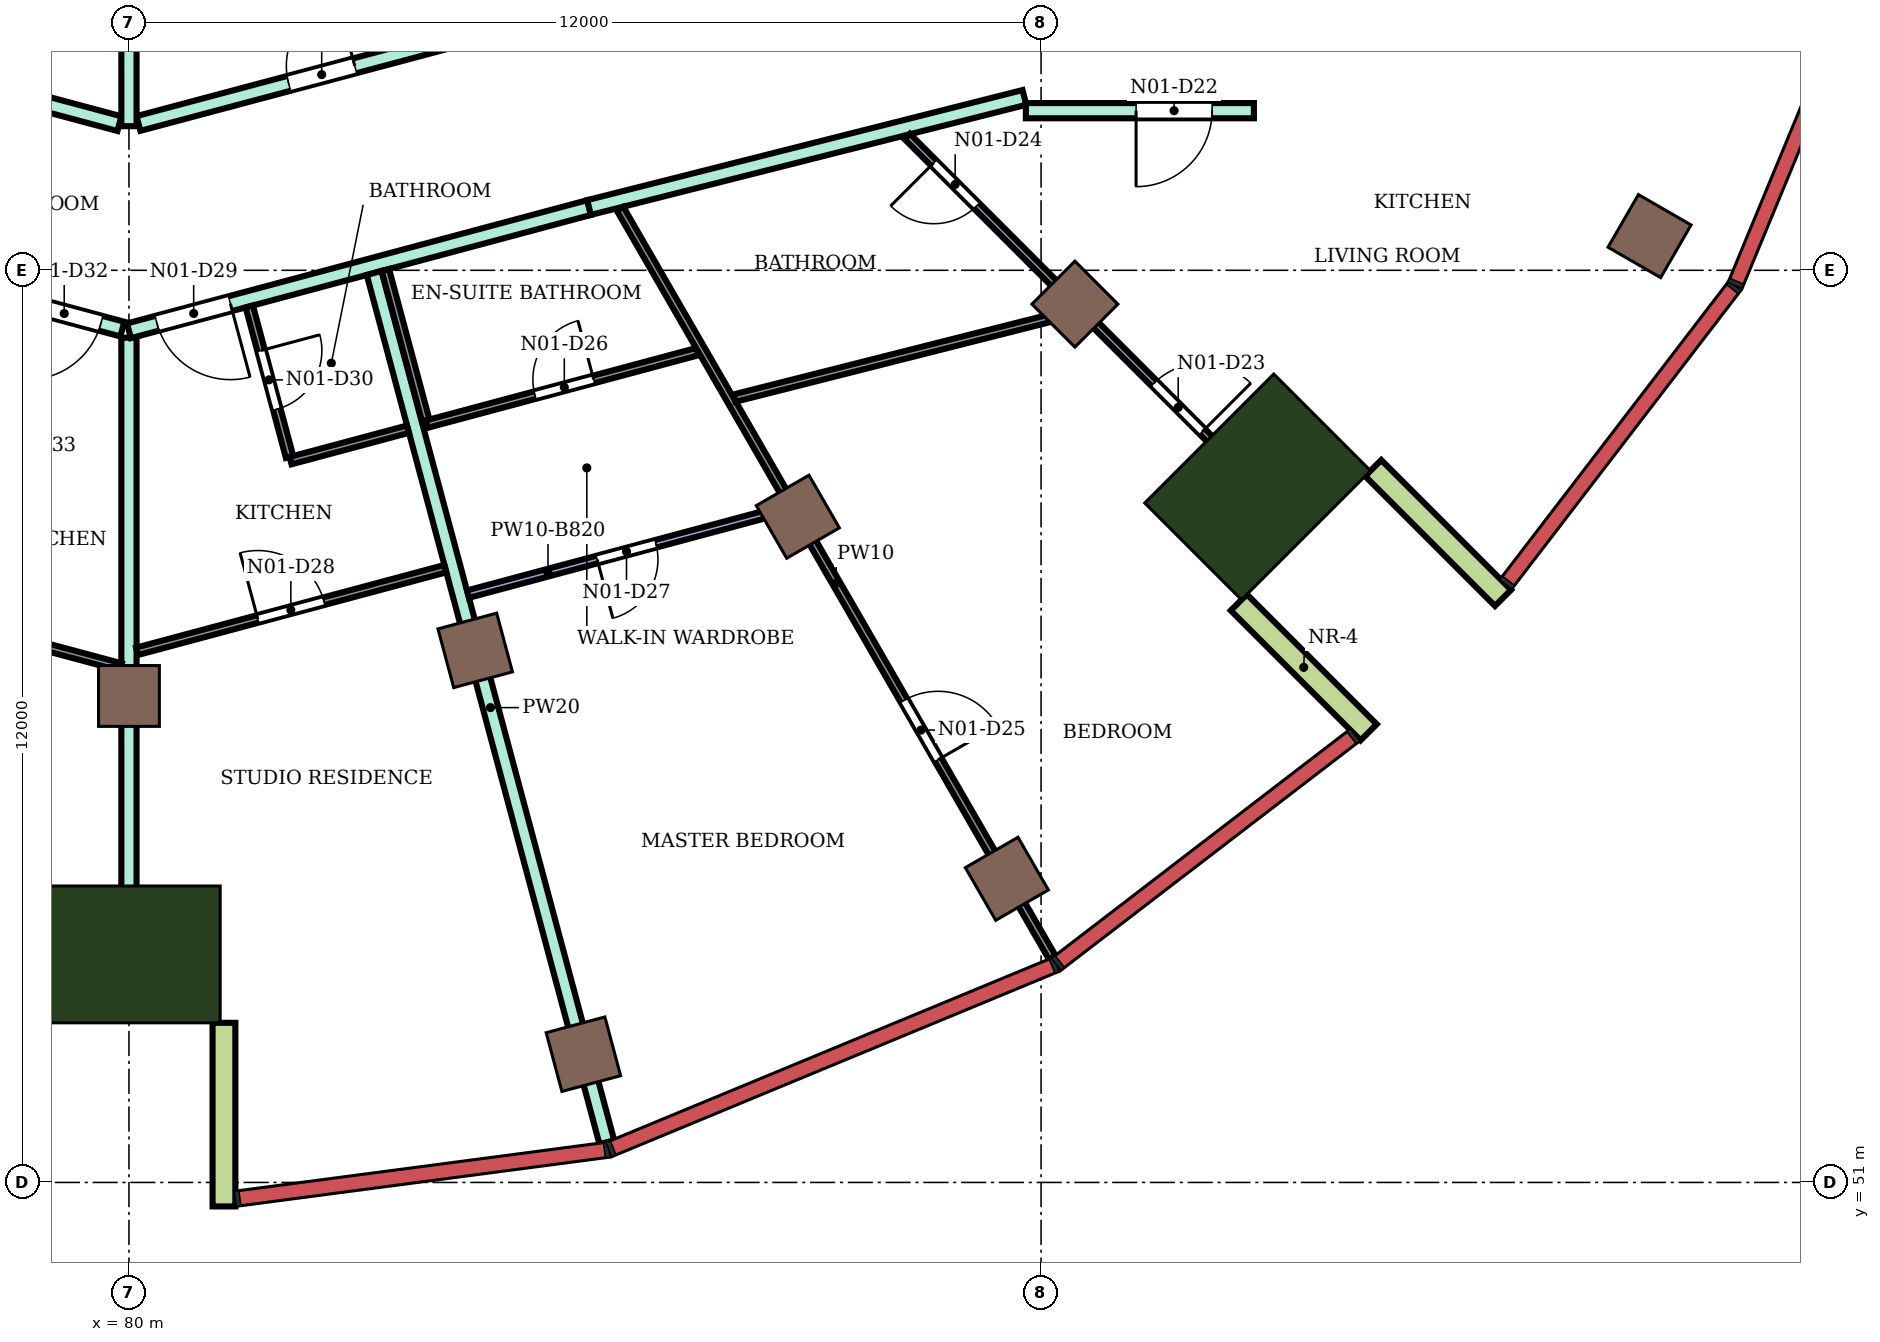
"""IFC4 building model, lengths in metres.
Left out: names, types, materials, properties, quantities, classifications, styles, units other than length and angle.
Written with IfcOpenShell. Run it as: python <this file> out.ifc"""

import sys

from ifc_helpers import new_model, si_unit, direction, frame, frame_2d, origin, origin_2d, place, context, subcontext, project, spatial, rectangle, extrude, element, fill, save


model = new_model("IFC4")
c1 = context("Model", 3, precision=1e-05, world=origin(), true_north=direction((0.0, 1.0)))
c2 = subcontext(c1, "Body", "Model", "MODEL_VIEW")
j1 = project(units=[si_unit("LENGTHUNIT", "METRE"), si_unit("PLANEANGLEUNIT", "RADIAN")], contexts=[c1])
p1 = place(None, origin())
s1 = spatial("IfcSite", under=j1, at=p1, CompositionType="ELEMENT")
p2 = place(p1, origin())
s2 = spatial("IfcBuilding", under=s1, at=p2, CompositionType="ELEMENT")
p3 = place(p2, frame((0.0, 0.0, 284.1)))
s3 = spatial("IfcBuildingStorey", under=s2, at=p3, CompositionType="ELEMENT", Elevation=284.1)
for number, where, z_axis, x_axis in (
    (1, (85.979, 52.687, 0.0), (0.0, 0.0, 1.0), (0.259, -0.966, 0.0)),
    (2, (91.55, 54.995, 0.0), (0.0, 0.0, 1.0), (0.5, -0.866, 0.0)),
    (3, (100.005, 63.45, 0.0), (0.0, 0.0, 1.0), (0.866, -0.5, 0.0)),
    (4, (80.0, 57.4, 0.0), (0.0, 0.0, 1.0), (0.0, -1.0, 0.0)),
    (5, (84.555, 58.0, 0.0), (0.0, 0.0, 1.0), (0.259, -0.966, 0.0)),
    (6, (88.8, 59.758, 0.0), (0.0, 0.0, 1.0), (0.5, -0.866, 0.0)),
    (7, (92.445, 62.555, 0.0), (0.0, 0.0, 1.0), (0.707, -0.707, 0.0)),
):
    element("IfcColumn", number, at=place(p3, frame(where, z_axis=z_axis, x_axis=x_axis)), inside=s3, PredefinedType="COLUMN", context=c2, shape_type="SweptSolid", body=[
        extrude(rectangle(XDim=0.8, YDim=0.8, at=origin_2d()), origin(), (0.0, 0.0, 1.0), 4.2),
    ])
for number, where, z_axis, x_axis in (
    (8, (80.0, 54.0, 0.0), (0.0, 0.0, 1.0), (0.0, -1.0, 0.0)),
    (9, (94.849, 60.151, 0.0), (0.0, 0.0, 1.0), (0.707, -0.707, 0.0)),
):
    element("IfcColumn", number, at=place(p3, frame(where, z_axis=z_axis, x_axis=x_axis)), inside=s3, PredefinedType="COLUMN", context=c2, shape_type="SweptSolid", body=[
        extrude(rectangle(XDim=1.8, YDim=2.4, at=origin_2d()), origin(), (0.0, 0.0, 1.0), 4.2),
    ])
p4 = place(p3, frame((81.25, 53.1, 0.0), z_axis=(0.0, 0.0, 1.0), x_axis=(0.0, -1.0, 0.0)))
e10 = element("IfcWall", 10, at=p4, inside=s3, PredefinedType="NOTDEFINED", context=c2, shape_type="SweptSolid", body=[
    extrude(rectangle(XDim=2.416, YDim=0.3, at=frame_2d((1.208, 0.0))), origin(), (0.0, 0.0, 1.0), 4.2),
])
for number, where, z_axis, x_axis in (
    (11, (94.602, 58.63, 0.0), (0.0, 0.0, 1.0), (0.707, -0.707, 0.0)),
    (12, (96.37, 60.398, 0.0), (0.0, 0.0, 1.0), (0.707, -0.707, 0.0)),
):
    element("IfcWall", number, at=place(p3, frame(where, z_axis=z_axis, x_axis=x_axis)), inside=s3, PredefinedType="NOTDEFINED", context=c2, shape_type="SweptSolid", body=[
        extrude(rectangle(XDim=2.416, YDim=0.3, at=frame_2d((1.208, 0.0))), origin(), (0.0, 0.0, 1.0), 4.2),
    ])
p5 = place(p3, frame((73.947, 63.826, 0.0), z_axis=(0.0, 0.0, 1.0), x_axis=(0.965872508768, -0.25901794688, 0.0)))
e13 = element("IfcWall", 13, at=p5, inside=s3, PredefinedType="PARTITIONING", context=c2, shape_type="SweptSolid", body=[
    extrude(rectangle(XDim=6.177, YDim=0.2, at=frame_2d((3.088, 0.0))), origin(), (0.0, 0.0, 1.0), 3.75),
])
p6 = place(p5, frame((4.885, 0.0, 0.0)))
e14 = element("IfcOpeningElement", 14, at=p6, cuts=e13, PredefinedType="OPENING", context=c2, shape_type="SweptSolid", body=[
    extrude(rectangle(XDim=1.0, YDim=2.1, at=frame_2d((0.5, 1.05))), frame((0.0, 0.11, 0.0), z_axis=(0.0, -1.0, 0.0), x_axis=(1.0, 0.0, 0.0)), (0.0, 0.0, 1.0), 0.22),
])
p7 = place(p5, frame((0.137, 0.0, 0.0)))
e15 = element("IfcOpeningElement", 15, at=p7, cuts=e13, PredefinedType="OPENING", context=c2, shape_type="SweptSolid", body=[
    extrude(rectangle(XDim=1.0, YDim=2.1, at=frame_2d((0.5, 1.05))), frame((0.0, 0.11, 0.0), z_axis=(0.0, -1.0, 0.0), x_axis=(1.0, 0.0, 0.0)), (0.0, 0.0, 1.0), 0.22),
])
p8 = place(p3, frame((74.603, 66.342, 0.0), z_axis=(0.0, 0.0, 1.0), x_axis=(0.965920893652, -0.258837453254, 0.0)))
e16 = element("IfcWall", 16, at=p8, inside=s3, PredefinedType="PARTITIONING", context=c2, shape_type="SweptSolid", body=[
    extrude(rectangle(XDim=5.458, YDim=0.2, at=frame_2d((2.729, 0.0))), origin(), (0.0, 0.0, 1.0), 3.75),
])
p9 = place(p8, frame((2.512, 0.0, 0.0)))
e17 = element("IfcOpeningElement", 17, at=p9, cuts=e16, PredefinedType="OPENING", context=c2, shape_type="SweptSolid", body=[
    extrude(rectangle(XDim=0.9, YDim=2.1, at=frame_2d((0.45, 1.05))), frame((0.0, 0.11, 0.0), z_axis=(0.0, -1.0, 0.0), x_axis=(1.0, 0.0, 0.0)), (0.0, 0.0, 1.0), 0.22),
])
p10 = place(p3, frame((80.125, 64.932, 0.0), z_axis=(0.0, 0.0, 1.0), x_axis=(0.966236955806, 0.257655089674, 0.0)))
e18 = element("IfcWall", 18, at=p10, inside=s3, PredefinedType="PARTITIONING", context=c2, shape_type="SweptSolid", body=[
    extrude(rectangle(XDim=8.039, YDim=0.2, at=frame_2d((4.02, 0.0))), origin(), (0.0, 0.0, 1.0), 3.75),
])
p11 = place(p10, frame((6.298, 0.0, 0.0)))
e19 = element("IfcOpeningElement", 19, at=p11, cuts=e18, PredefinedType="OPENING", context=c2, shape_type="SweptSolid", body=[
    extrude(rectangle(XDim=0.9, YDim=2.1, at=frame_2d((0.45, 1.05))), frame((0.0, 0.11, 0.0), z_axis=(0.0, -1.0, 0.0), x_axis=(1.0, 0.0, 0.0)), (0.0, 0.0, 1.0), 0.22),
])
p12 = place(p10, frame((2.045, 0.0, 0.0)))
e20 = element("IfcOpeningElement", 20, at=p12, cuts=e18, PredefinedType="OPENING", context=c2, shape_type="SweptSolid", body=[
    extrude(rectangle(XDim=0.9, YDim=2.1, at=frame_2d((0.45, 1.05))), frame((0.0, 0.11, 0.0), z_axis=(0.0, -1.0, 0.0), x_axis=(1.0, 0.0, 0.0)), (0.0, 0.0, 1.0), 0.22),
])
p13 = place(p3, frame((80.0, 53.3, 0.0), z_axis=(0.0, 0.0, 1.0), x_axis=(0.0, 1.0, 0.0)))
e21 = element("IfcWall", 21, at=p13, inside=s3, PredefinedType="PARTITIONING", context=c2, shape_type="SweptSolid", body=[
    extrude(rectangle(XDim=8.814, YDim=0.2, at=frame_2d((4.407, 0.0))), origin(), (0.0, 0.0, 1.0), 3.75),
])
p14 = place(p3, frame((80.0, 62.204, 0.0), z_axis=(0.0, 0.0, 1.0), x_axis=(0.965960221635, 0.258690645788, 0.0)))
e22 = element("IfcWall", 22, at=p14, inside=s3, PredefinedType="PARTITIONING", context=c2, shape_type="SweptSolid", body=[
    extrude(rectangle(XDim=6.267, YDim=0.2, at=frame_2d((3.133, 0.0))), origin(), (0.0, 0.0, 1.0), 3.75),
])
p15 = place(p14, frame((0.382, 0.0, 0.0)))
e23 = element("IfcOpeningElement", 23, at=p15, cuts=e22, PredefinedType="OPENING", context=c2, shape_type="SweptSolid", body=[
    extrude(rectangle(XDim=1.0, YDim=2.1, at=frame_2d((0.5, 1.05))), frame((0.0, 0.11, 0.0), z_axis=(0.0, -1.0, 0.0), x_axis=(1.0, 0.0, 0.0)), (0.0, 0.0, 1.0), 0.22),
])
p16 = place(p3, frame((80.0, 64.896, 0.0), z_axis=(0.0, 0.0, 1.0), x_axis=(0.0, 1.0, 0.0)))
e24 = element("IfcWall", 24, at=p16, inside=s3, PredefinedType="PARTITIONING", context=c2, shape_type="SweptSolid", body=[
    extrude(rectangle(XDim=2.405, YDim=0.2, at=frame_2d((1.203, 0.0))), origin(), (0.0, 0.0, 1.0), 3.75),
])
p17 = place(p3, frame((83.225, 62.965, 0.0), z_axis=(0.0, 0.0, 1.0), x_axis=(0.258656021451, -0.965969493601, 0.0)))
e25 = element("IfcWall", 25, at=p17, inside=s3, PredefinedType="PARTITIONING", context=c2, shape_type="SweptSolid", body=[
    extrude(rectangle(XDim=11.838, YDim=0.2, at=frame_2d((5.919, 0.0))), origin(), (0.0, 0.0, 1.0), 3.75),
])
p18 = place(p3, frame((86.053, 63.826, 0.0), z_axis=(0.0, 0.0, 1.0), x_axis=(0.969490004987, 0.245130843083, 0.0)))
e26 = element("IfcWall", 26, at=p18, inside=s3, PredefinedType="PARTITIONING", context=c2, shape_type="SweptSolid", body=[
    extrude(rectangle(XDim=5.908, YDim=0.2, at=frame_2d((2.954, 0.0))), origin(), (0.0, 0.0, 1.0), 3.75),
])
p19 = place(p3, frame((91.8, 65.1, 0.0), z_axis=(0.0, 0.0, 1.0), x_axis=(1.0, 0.0, 0.0)))
e27 = element("IfcWall", 27, at=p19, inside=s3, PredefinedType="PARTITIONING", context=c2, shape_type="SweptSolid", body=[
    extrude(rectangle(XDim=3.0, YDim=0.2, at=frame_2d((1.5, 0.0))), origin(), (0.0, 0.0, 1.0), 3.75),
])
p20 = place(p19, frame((1.45, 0.0, 0.0)))
e28 = element("IfcOpeningElement", 28, at=p20, cuts=e27, PredefinedType="OPENING", context=c2, shape_type="SweptSolid", body=[
    extrude(rectangle(XDim=1.0, YDim=2.1, at=frame_2d((0.5, 1.05))), frame((0.0, 0.11, 0.0), z_axis=(0.0, -1.0, 0.0), x_axis=(1.0, 0.0, 0.0)), (0.0, 0.0, 1.0), 0.22),
])
p21 = place(p3, frame((75.795, 58.879, 0.0), z_axis=(0.0, 0.0, 1.0), x_axis=(0.965895141847, -0.258933533857, 0.0)))
e29 = element("IfcWall", 29, at=p21, inside=s3, PredefinedType="PARTITIONING", context=c2, shape_type="SweptSolid", body=[
    extrude(rectangle(XDim=4.244, YDim=0.1, at=frame_2d((2.122, 0.0))), origin(), (0.0, 0.0, 1.0), 3.75),
])
p22 = place(p21, frame((1.672, 0.0, 0.0)))
e30 = element("IfcOpeningElement", 30, at=p22, cuts=e29, PredefinedType="OPENING", context=c2, shape_type="SweptSolid", body=[
    extrude(rectangle(XDim=0.9, YDim=2.1, at=frame_2d((0.45, 1.05))), frame((0.0, 0.06, 0.0), z_axis=(0.0, -1.0, 0.0), x_axis=(1.0, 0.0, 0.0)), (0.0, 0.0, 1.0), 0.12),
])
p23 = place(p3, frame((80.106, 57.988, 0.0), z_axis=(0.0, 0.0, 1.0), x_axis=(0.965893555682, 0.25893945063, 0.0)))
e31 = element("IfcWall", 31, at=p23, inside=s3, PredefinedType="PARTITIONING", context=c2, shape_type="SweptSolid", body=[
    extrude(rectangle(XDim=4.2, YDim=0.1, at=frame_2d((2.1, 0.0))), origin(), (0.0, 0.0, 1.0), 3.75),
])
p24 = place(p23, frame((1.645, 0.0, 0.0)))
e32 = element("IfcOpeningElement", 32, at=p24, cuts=e31, PredefinedType="OPENING", context=c2, shape_type="SweptSolid", body=[
    extrude(rectangle(XDim=0.9, YDim=2.1, at=frame_2d((0.45, 1.05))), frame((0.0, 0.06, 0.0), z_axis=(0.0, -1.0, 0.0), x_axis=(1.0, 0.0, 0.0)), (0.0, 0.0, 1.0), 0.12),
])
p25 = place(p3, frame((81.583, 62.524, 0.0), z_axis=(0.0, 0.0, 1.0), x_axis=(0.258559472989, -0.965995341049, 0.0)))
e33 = element("IfcWall", 33, at=p25, inside=s3, PredefinedType="PARTITIONING", context=c2, shape_type="SweptSolid", body=[
    extrude(rectangle(XDim=2.05, YDim=0.1, at=frame_2d((1.025, 0.0))), origin(), (0.0, 0.0, 1.0), 3.75),
])
p26 = place(p25, frame((0.6, 0.0, 0.0)))
e34 = element("IfcOpeningElement", 34, at=p26, cuts=e33, PredefinedType="OPENING", context=c2, shape_type="SweptSolid", body=[
    extrude(rectangle(XDim=0.8, YDim=2.1, at=frame_2d((0.4, 1.05))), frame((0.0, 0.06, 0.0), z_axis=(0.0, -1.0, 0.0), x_axis=(1.0, 0.0, 0.0)), (0.0, 0.0, 1.0), 0.12),
])
p27 = place(p3, frame((82.126, 60.496, 0.0), z_axis=(0.0, 0.0, 1.0), x_axis=(0.965930342518, 0.258802189717, 0.0)))
e35 = element("IfcWall", 35, at=p27, inside=s3, PredefinedType="PARTITIONING", context=c2, shape_type="SweptSolid", body=[
    extrude(rectangle(XDim=1.6, YDim=0.1, at=frame_2d((0.8, 0.0))), origin(), (0.0, 0.0, 1.0), 3.75),
])
p28 = place(p3, frame((83.374, 63.004, 0.0), z_axis=(0.0, 0.0, 1.0), x_axis=(0.259144823933, -0.965838475227, 0.0)))
e36 = element("IfcWall", 36, at=p28, inside=s3, PredefinedType="PARTITIONING", context=c2, shape_type="SweptSolid", body=[
    extrude(rectangle(XDim=2.05, YDim=0.1, at=frame_2d((1.025, 0.0))), origin(), (0.0, 0.0, 1.0), 3.75),
])
p29 = place(p3, frame((83.918, 60.976, 0.0), z_axis=(0.0, 0.0, 1.0), x_axis=(0.965914351064, 0.258861867428, 0.0)))
e37 = element("IfcWall", 37, at=p29, inside=s3, PredefinedType="PARTITIONING", context=c2, shape_type="SweptSolid", body=[
    extrude(rectangle(XDim=3.687, YDim=0.1, at=frame_2d((1.843, 0.0))), origin(), (0.0, 0.0, 1.0), 3.75),
])
p30 = place(p29, frame((1.473, 0.0, 0.0)))
e38 = element("IfcOpeningElement", 38, at=p30, cuts=e37, PredefinedType="OPENING", context=c2, shape_type="SweptSolid", body=[
    extrude(rectangle(XDim=0.8, YDim=2.1, at=frame_2d((0.4, 1.05))), frame((0.0, 0.06, 0.0), z_axis=(0.0, -1.0, 0.0), x_axis=(1.0, 0.0, 0.0)), (0.0, 0.0, 1.0), 0.12),
])
p31 = place(p3, frame((84.461, 58.74, 0.0), z_axis=(0.0, 0.0, 1.0), x_axis=(0.965893774063, 0.258938636026, 0.0)))
e39 = element("IfcWall", 39, at=p31, inside=s3, PredefinedType="PARTITIONING", context=c2, shape_type="SweptSolid", body=[
    extrude(rectangle(XDim=4.358, YDim=0.1, at=frame_2d((2.179, 0.0))), origin(), (0.0, 0.0, 1.0), 3.38),
])
p32 = place(p31, frame((1.759, 0.0, 0.0)))
e40 = element("IfcOpeningElement", 40, at=p32, cuts=e39, PredefinedType="OPENING", context=c2, shape_type="SweptSolid", body=[
    extrude(rectangle(XDim=0.8, YDim=2.1, at=frame_2d((0.4, 1.05))), frame((0.0, 0.06, 0.0), z_axis=(0.0, -1.0, 0.0), x_axis=(1.0, 0.0, 0.0)), (0.0, 0.0, 1.0), 0.12),
])
p33 = place(p3, frame((86.461, 63.81, 0.0), z_axis=(0.0, 0.0, 1.0), x_axis=(0.499933609462, -0.866063730986, 0.0)))
e41 = element("IfcWall", 41, at=p33, inside=s3, PredefinedType="PARTITIONING", context=c2, shape_type="SweptSolid", body=[
    extrude(rectangle(XDim=11.376, YDim=0.1, at=frame_2d((5.688, 0.0))), origin(), (0.0, 0.0, 1.0), 3.75),
])
p34 = place(p33, frame((7.47, 0.0, 0.0)))
e42 = element("IfcOpeningElement", 42, at=p34, cuts=e41, PredefinedType="OPENING", context=c2, shape_type="SweptSolid", body=[
    extrude(rectangle(XDim=0.9, YDim=2.1, at=frame_2d((0.45, 1.05))), frame((0.0, 0.06, 0.0), z_axis=(0.0, -1.0, 0.0), x_axis=(1.0, 0.0, 0.0)), (0.0, 0.0, 1.0), 0.12),
])
p35 = place(p3, frame((87.966, 61.319, 0.0), z_axis=(0.0, 0.0, 1.0), x_axis=(0.969427184869, 0.245379162189, 0.0)))
e43 = element("IfcWall", 43, at=p35, inside=s3, PredefinedType="PARTITIONING", context=c2, shape_type="SweptSolid", body=[
    extrude(rectangle(XDim=4.625, YDim=0.1, at=frame_2d((2.312, 0.0))), origin(), (0.0, 0.0, 1.0), 3.75),
])
p36 = place(p3, frame((90.239, 64.761, 0.0), z_axis=(0.0, 0.0, 1.0), x_axis=(0.707106781187, -0.707106781187, 0.0)))
e44 = element("IfcWall", 44, at=p36, inside=s3, PredefinedType="PARTITIONING", context=c2, shape_type="SweptSolid", body=[
    extrude(rectangle(XDim=7.22, YDim=0.1, at=frame_2d((3.61, 0.0))), origin(), (0.0, 0.0, 1.0), 3.75),
])
p37 = place(p36, frame((4.592, 0.0, 0.0)))
e45 = element("IfcOpeningElement", 45, at=p37, cuts=e44, PredefinedType="OPENING", context=c2, shape_type="SweptSolid", body=[
    extrude(rectangle(XDim=0.9, YDim=2.1, at=frame_2d((0.45, 1.05))), frame((0.0, 0.06, 0.0), z_axis=(0.0, -1.0, 0.0), x_axis=(1.0, 0.0, 0.0)), (0.0, 0.0, 1.0), 0.12),
])
p38 = place(p36, frame((0.492, 0.0, 0.0)))
e46 = element("IfcOpeningElement", 46, at=p38, cuts=e44, PredefinedType="OPENING", context=c2, shape_type="SweptSolid", body=[
    extrude(rectangle(XDim=0.8, YDim=2.1, at=frame_2d((0.4, 1.05))), frame((0.0, 0.06, 0.0), z_axis=(0.0, -1.0, 0.0), x_axis=(1.0, 0.0, 0.0)), (0.0, 0.0, 1.0), 0.12),
])
p39 = place(p20, frame((1.0, 0.0, 0.0), z_axis=(0.0, 0.0, 1.0), x_axis=(-1.0, 0.0, 0.0)))
e47 = element("IfcDoor", 47, at=p39, inside=s3, OperationType="SINGLE_SWING_RIGHT", PredefinedType="DOOR", context=c2, shape_type="SweptSolid", body=[
    extrude(rectangle(XDim=1.0, YDim=2.1, at=frame_2d((0.5, 1.05))), frame((0.0, 0.025, 0.0), z_axis=(0.0, -1.0, 0.0), x_axis=(1.0, 0.0, 0.0)), (0.0, 0.0, 1.0), 0.05),
])
fill(e28, e47)
p40 = place(p37, origin())
e48 = element("IfcDoor", 48, at=p40, inside=s3, OperationType="SINGLE_SWING_RIGHT", PredefinedType="DOOR", context=c2, shape_type="SweptSolid", body=[
    extrude(rectangle(XDim=0.9, YDim=2.1, at=frame_2d((0.45, 1.05))), frame((0.0, 0.025, 0.0), z_axis=(0.0, -1.0, 0.0), x_axis=(1.0, 0.0, 0.0)), (0.0, 0.0, 1.0), 0.05),
])
fill(e45, e48)
p41 = place(p38, frame((0.8, 0.0, 0.0), z_axis=(0.0, 0.0, 1.0), x_axis=(-1.0, 0.0, 0.0)))
e49 = element("IfcDoor", 49, at=p41, inside=s3, OperationType="SINGLE_SWING_RIGHT", PredefinedType="DOOR", context=c2, shape_type="SweptSolid", body=[
    extrude(rectangle(XDim=0.8, YDim=2.1, at=frame_2d((0.4, 1.05))), frame((0.0, 0.025, 0.0), z_axis=(0.0, -1.0, 0.0), x_axis=(1.0, 0.0, 0.0)), (0.0, 0.0, 1.0), 0.05),
])
fill(e46, e49)
p42 = place(p34, origin())
e50 = element("IfcDoor", 50, at=p42, inside=s3, OperationType="SINGLE_SWING_RIGHT", PredefinedType="DOOR", context=c2, shape_type="SweptSolid", body=[
    extrude(rectangle(XDim=0.9, YDim=2.1, at=frame_2d((0.45, 1.05))), frame((0.0, 0.025, 0.0), z_axis=(0.0, -1.0, 0.0), x_axis=(1.0, 0.0, 0.0)), (0.0, 0.0, 1.0), 0.05),
])
fill(e42, e50)
p43 = place(p30, origin())
e51 = element("IfcDoor", 51, at=p43, inside=s3, OperationType="SINGLE_SWING_RIGHT", PredefinedType="DOOR", context=c2, shape_type="SweptSolid", body=[
    extrude(rectangle(XDim=0.8, YDim=2.1, at=frame_2d((0.4, 1.05))), frame((0.0, 0.025, 0.0), z_axis=(0.0, -1.0, 0.0), x_axis=(1.0, 0.0, 0.0)), (0.0, 0.0, 1.0), 0.05),
])
fill(e38, e51)
p44 = place(p32, frame((0.8, 0.0, 0.0), z_axis=(0.0, 0.0, 1.0), x_axis=(-1.0, 0.0, 0.0)))
e52 = element("IfcDoor", 52, at=p44, inside=s3, OperationType="SINGLE_SWING_RIGHT", PredefinedType="DOOR", context=c2, shape_type="SweptSolid", body=[
    extrude(rectangle(XDim=0.8, YDim=2.1, at=frame_2d((0.4, 1.05))), frame((0.0, 0.025, 0.0), z_axis=(0.0, -1.0, 0.0), x_axis=(1.0, 0.0, 0.0)), (0.0, 0.0, 1.0), 0.05),
])
fill(e40, e52)
p45 = place(p24, origin())
e53 = element("IfcDoor", 53, at=p45, inside=s3, OperationType="SINGLE_SWING_LEFT", PredefinedType="DOOR", context=c2, shape_type="SweptSolid", body=[
    extrude(rectangle(XDim=0.9, YDim=2.1, at=frame_2d((0.45, 1.05))), frame((0.0, 0.025, 0.0), z_axis=(0.0, -1.0, 0.0), x_axis=(1.0, 0.0, 0.0)), (0.0, 0.0, 1.0), 0.05),
])
fill(e32, e53)
p46 = place(p15, frame((1.0, 0.0, 0.0), z_axis=(0.0, 0.0, 1.0), x_axis=(-1.0, 0.0, 0.0)))
e54 = element("IfcDoor", 54, at=p46, inside=s3, OperationType="SINGLE_SWING_LEFT", PredefinedType="DOOR", context=c2, shape_type="SweptSolid", body=[
    extrude(rectangle(XDim=1.0, YDim=2.1, at=frame_2d((0.5, 1.05))), frame((0.0, 0.025, 0.0), z_axis=(0.0, -1.0, 0.0), x_axis=(1.0, 0.0, 0.0)), (0.0, 0.0, 1.0), 0.05),
])
fill(e23, e54)
p47 = place(p26, origin())
e55 = element("IfcDoor", 55, at=p47, inside=s3, OperationType="SINGLE_SWING_LEFT", PredefinedType="DOOR", context=c2, shape_type="SweptSolid", body=[
    extrude(rectangle(XDim=0.8, YDim=2.1, at=frame_2d((0.4, 1.05))), frame((0.0, 0.025, 0.0), z_axis=(0.0, -1.0, 0.0), x_axis=(1.0, 0.0, 0.0)), (0.0, 0.0, 1.0), 0.05),
])
fill(e34, e55)
p48 = place(p6, frame((1.0, 0.0, 0.0), z_axis=(0.0, 0.0, 1.0), x_axis=(-1.0, 0.0, 0.0)))
e56 = element("IfcDoor", 56, at=p48, inside=s3, OperationType="SINGLE_SWING_RIGHT", PredefinedType="DOOR", context=c2, shape_type="SweptSolid", body=[
    extrude(rectangle(XDim=1.0, YDim=2.1, at=frame_2d((0.5, 1.05))), frame((0.0, 0.025, 0.0), z_axis=(0.0, -1.0, 0.0), x_axis=(1.0, 0.0, 0.0)), (0.0, 0.0, 1.0), 0.05),
])
fill(e14, e56)
p49 = place(p12, origin())
e57 = element("IfcDoor", 57, at=p49, inside=s3, OperationType="SINGLE_SWING_RIGHT", PredefinedType="DOOR", context=c2, shape_type="SweptSolid", body=[
    extrude(rectangle(XDim=0.9, YDim=2.1, at=frame_2d((0.45, 1.05))), frame((0.0, 0.025, 0.0), z_axis=(0.0, -1.0, 0.0), x_axis=(1.0, 0.0, 0.0)), (0.0, 0.0, 1.0), 0.05),
])
fill(e20, e57)
save(model, sys.argv[1])
